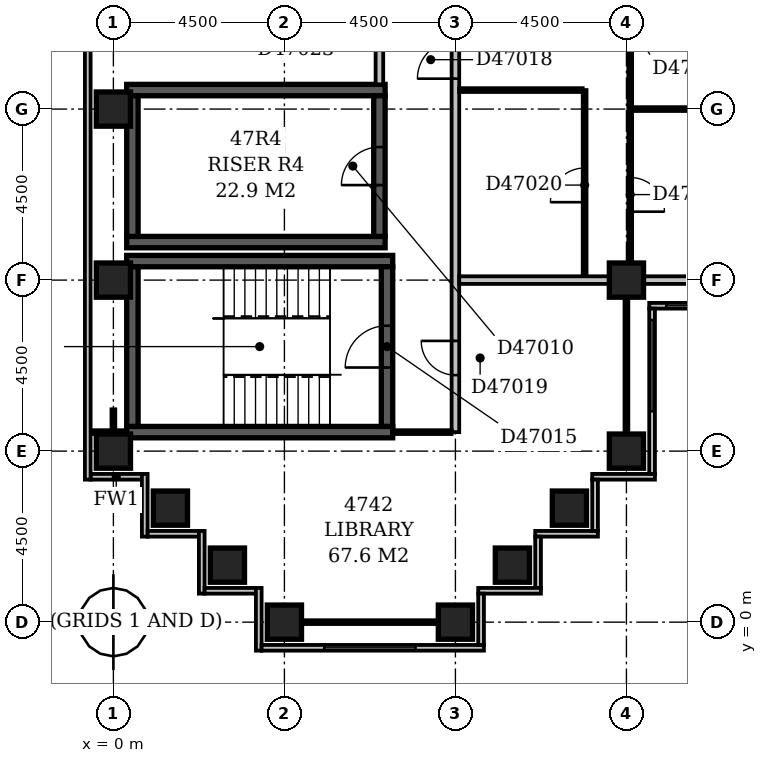
"""IFC4 building model, lengths in metres.
Left out: names, types, materials, properties, quantities, classifications, styles, units other than length and angle.
Written with IfcOpenShell. Run it as: python <this file> out.ifc"""

import sys

from ifc_helpers import new_model, si_unit, direction, frame, frame_2d, origin, origin_2d, place, context, subcontext, project, spatial, rectangle, extrude, element, fill, save


model = new_model("IFC4")
c1 = context("Model", 3, precision=1e-05, world=origin(), true_north=direction((0.0, 1.0)))
c2 = subcontext(c1, "Body", "Model", "MODEL_VIEW")
j1 = project(units=[si_unit("LENGTHUNIT", "METRE"), si_unit("PLANEANGLEUNIT", "RADIAN")], contexts=[c1])
p1 = place(None, origin())
s1 = spatial("IfcSite", under=j1, at=p1, CompositionType="ELEMENT")
p2 = place(p1, origin())
s2 = spatial("IfcBuilding", under=s1, at=p2, CompositionType="ELEMENT")
p3 = place(p2, frame((0.0, 0.0, 186.2)))
s3 = spatial("IfcBuildingStorey", under=s2, at=p3, CompositionType="ELEMENT", Elevation=186.2)
for number, where, z_axis, x_axis in (
    (1, (0.35, 5.0, -0.35), (0.0, 0.0, 1.0), (1.0, 0.0, 0.0)),
    (2, (0.35, 9.5, -0.35), (0.0, 0.0, 1.0), (1.0, 0.0, 0.0)),
):
    element("IfcWall", number, at=place(p3, frame(where, z_axis=z_axis, x_axis=x_axis)), inside=s3, PredefinedType="SHEAR", context=c2, shape_type="SweptSolid", body=[
        extrude(rectangle(XDim=7.0, YDim=0.3, at=frame_2d((3.5, 0.0))), origin(), (0.0, 0.0, 1.0), 3.65),
    ])
for number, where, z_axis, x_axis in (
    (3, (0.35, 10.0, -0.35), (0.0, 0.0, 1.0), (1.0, 0.0, 0.0)),
    (4, (0.35, 14.0, -0.35), (0.0, 0.0, 1.0), (1.0, 0.0, 0.0)),
):
    element("IfcWall", number, at=place(p3, frame(where, z_axis=z_axis, x_axis=x_axis)), inside=s3, PredefinedType="SHEAR", context=c2, shape_type="SweptSolid", body=[
        extrude(rectangle(XDim=6.8, YDim=0.3, at=frame_2d((3.4, 0.0))), origin(), (0.0, 0.0, 1.0), 3.65),
    ])
p4 = place(p3, frame((0.5, 5.15, -0.35), z_axis=(0.0, 0.0, 1.0), x_axis=(0.0, 1.0, 0.0)))
e5 = element("IfcWall", 5, at=p4, inside=s3, PredefinedType="SHEAR", context=c2, shape_type="SweptSolid", body=[
    extrude(rectangle(XDim=4.2, YDim=0.3, at=frame_2d((2.1, 0.0))), origin(), (0.0, 0.0, 1.0), 3.65),
])
p5 = place(p3, frame((0.5, 10.15, -0.35), z_axis=(0.0, 0.0, 1.0), x_axis=(0.0, 1.0, 0.0)))
e6 = element("IfcWall", 6, at=p5, inside=s3, PredefinedType="SHEAR", context=c2, shape_type="SweptSolid", body=[
    extrude(rectangle(XDim=3.7, YDim=0.3, at=frame_2d((1.85, 0.0))), origin(), (0.0, 0.0, 1.0), 3.65),
])
p6 = place(p3, frame((7.0, 10.15, -0.35), z_axis=(0.0, 0.0, 1.0), x_axis=(0.0, 1.0, 0.0)))
e7 = element("IfcWall", 7, at=p6, inside=s3, PredefinedType="SHEAR", context=c2, shape_type="SweptSolid", body=[
    extrude(rectangle(XDim=3.7, YDim=0.3, at=frame_2d((1.85, 0.0))), origin(), (0.0, 0.0, 1.0), 3.65),
])
p7 = place(p6, frame((1.35, 0.0, 0.35)))
e8 = element("IfcOpeningElement", 8, at=p7, cuts=e7, PredefinedType="OPENING", context=c2, shape_type="SweptSolid", body=[
    extrude(rectangle(XDim=1.0, YDim=2.1, at=frame_2d((0.5, 1.05))), frame((0.0, 0.162, 0.0), z_axis=(0.0, -1.0, 0.0), x_axis=(1.0, 0.0, 0.0)), (0.0, 0.0, 1.0), 0.324),
])
p8 = place(p3, frame((7.2, 5.15, -0.35), z_axis=(0.0, 0.0, 1.0), x_axis=(0.0, 1.0, 0.0)))
e9 = element("IfcWall", 9, at=p8, inside=s3, PredefinedType="SHEAR", context=c2, shape_type="SweptSolid", body=[
    extrude(rectangle(XDim=4.2, YDim=0.3, at=frame_2d((2.1, 0.0))), origin(), (0.0, 0.0, 1.0), 3.65),
])
p9 = place(p8, frame((1.55, 0.0, 0.35)))
e10 = element("IfcOpeningElement", 10, at=p9, cuts=e9, PredefinedType="OPENING", context=c2, shape_type="SweptSolid", body=[
    extrude(rectangle(XDim=1.1, YDim=2.1, at=frame_2d((0.55, 1.05))), frame((0.0, 0.162, 0.0), z_axis=(0.0, -1.0, 0.0), x_axis=(1.0, 0.0, 0.0)), (0.0, 0.0, 1.0), 0.324),
])
for number, where, z_axis, x_axis in (
    (11, (4.5, 0.0, -0.35), (0.0, 0.0, 1.0), (1.0, 0.0, 0.0)),
    (12, (9.0, 0.0, -0.35), (0.0, 0.0, 1.0), (1.0, 0.0, 0.0)),
    (13, (3.0, 1.5, -0.35), (0.0, 0.0, 1.0), (1.0, 0.0, 0.0)),
    (14, (10.5, 1.5, -0.35), (0.0, 0.0, 1.0), (1.0, 0.0, 0.0)),
    (15, (1.5, 3.0, -0.35), (0.0, 0.0, 1.0), (1.0, 0.0, 0.0)),
    (16, (12.0, 3.0, -0.35), (0.0, 0.0, 1.0), (1.0, 0.0, 0.0)),
    (17, (0.0, 4.5, -0.35), (0.0, 0.0, 1.0), (1.0, 0.0, 0.0)),
    (18, (13.5, 4.5, -0.35), (0.0, 0.0, 1.0), (1.0, 0.0, 0.0)),
    (19, (0.0, 9.0, -0.35), (0.0, 0.0, 1.0), (1.0, 0.0, 0.0)),
    (20, (13.5, 9.0, -0.35), (0.0, 0.0, 1.0), (1.0, 0.0, 0.0)),
    (21, (0.0, 13.5, -0.35), (0.0, 0.0, 1.0), (1.0, 0.0, 0.0)),
):
    element("IfcColumn", number, at=place(p3, frame(where, z_axis=z_axis, x_axis=x_axis)), inside=s3, PredefinedType="COLUMN", context=c2, shape_type="SweptSolid", body=[
        extrude(rectangle(XDim=0.9, YDim=0.9, at=origin_2d()), origin(), (0.0, 0.0, 1.0), 3.65),
    ])
p10 = place(p3, frame((-0.6, 3.825, 0.0), z_axis=(0.0, 0.0, 1.0), x_axis=(1.0, 0.0, 0.0)))
e22 = element("IfcWall", 22, at=p10, inside=s3, PredefinedType="STANDARD", context=c2, shape_type="SweptSolid", body=[
    extrude(rectangle(XDim=1.35, YDim=0.15, at=frame_2d((0.675, 0.0))), origin(), (0.0, 0.0, 1.0), 2.7),
])
p11 = place(p3, frame((0.825, 3.9, 0.0), z_axis=(0.0, 0.0, 1.0), x_axis=(0.0, -1.0, 0.0)))
e23 = element("IfcWall", 23, at=p11, inside=s3, PredefinedType="STANDARD", context=c2, shape_type="SweptSolid", body=[
    extrude(rectangle(XDim=1.65, YDim=0.15, at=frame_2d((0.825, 0.0))), origin(), (0.0, 0.0, 1.0), 2.7),
])
p12 = place(p3, frame((0.9, 2.325, 0.0), z_axis=(0.0, 0.0, 1.0), x_axis=(1.0, 0.0, 0.0)))
e24 = element("IfcWall", 24, at=p12, inside=s3, PredefinedType="STANDARD", context=c2, shape_type="SweptSolid", body=[
    extrude(rectangle(XDim=1.35, YDim=0.15, at=frame_2d((0.675, 0.0))), origin(), (0.0, 0.0, 1.0), 2.7),
])
p13 = place(p3, frame((2.325, 2.4, 0.0), z_axis=(0.0, 0.0, 1.0), x_axis=(0.0, -1.0, 0.0)))
e25 = element("IfcWall", 25, at=p13, inside=s3, PredefinedType="STANDARD", context=c2, shape_type="SweptSolid", body=[
    extrude(rectangle(XDim=1.65, YDim=0.15, at=frame_2d((0.825, 0.0))), origin(), (0.0, 0.0, 1.0), 2.7),
])
p14 = place(p3, frame((2.4, 0.825, 0.0), z_axis=(0.0, 0.0, 1.0), x_axis=(1.0, 0.0, 0.0)))
e26 = element("IfcWall", 26, at=p14, inside=s3, PredefinedType="STANDARD", context=c2, shape_type="SweptSolid", body=[
    extrude(rectangle(XDim=1.35, YDim=0.15, at=frame_2d((0.675, 0.0))), origin(), (0.0, 0.0, 1.0), 2.7),
])
p15 = place(p3, frame((3.825, 0.9, 0.0), z_axis=(0.0, 0.0, 1.0), x_axis=(0.0, -1.0, 0.0)))
e27 = element("IfcWall", 27, at=p15, inside=s3, PredefinedType="STANDARD", context=c2, shape_type="SweptSolid", body=[
    extrude(rectangle(XDim=1.65, YDim=0.15, at=frame_2d((0.825, 0.0))), origin(), (0.0, 0.0, 1.0), 2.7),
])
p16 = place(p3, frame((3.9, -0.675, 0.0), z_axis=(0.0, 0.0, 1.0), x_axis=(1.0, 0.0, 0.0)))
e28 = element("IfcWall", 28, at=p16, inside=s3, PredefinedType="STANDARD", context=c2, shape_type="SweptSolid", body=[
    extrude(rectangle(XDim=5.85, YDim=0.15, at=frame_2d((2.925, 0.0))), origin(), (0.0, 0.0, 1.0), 2.7),
])
p17 = place(p16, frame((1.65, 0.0, 0.6)))
e29 = element("IfcOpeningElement", 29, at=p17, cuts=e28, PredefinedType="OPENING", context=c2, shape_type="SweptSolid", body=[
    extrude(rectangle(XDim=2.4, YDim=1.8, at=frame_2d((1.2, 0.9))), frame((0.0, 0.087, 0.0), z_axis=(0.0, -1.0, 0.0), x_axis=(1.0, 0.0, 0.0)), (0.0, 0.0, 1.0), 0.174),
])
p18 = place(p3, frame((9.675, -0.6, 0.0), z_axis=(0.0, 0.0, 1.0), x_axis=(0.0, 1.0, 0.0)))
e30 = element("IfcWall", 30, at=p18, inside=s3, PredefinedType="STANDARD", context=c2, shape_type="SweptSolid", body=[
    extrude(rectangle(XDim=1.35, YDim=0.15, at=frame_2d((0.675, 0.0))), origin(), (0.0, 0.0, 1.0), 2.7),
])
p19 = place(p3, frame((9.6, 0.825, 0.0), z_axis=(0.0, 0.0, 1.0), x_axis=(1.0, 0.0, 0.0)))
e31 = element("IfcWall", 31, at=p19, inside=s3, PredefinedType="STANDARD", context=c2, shape_type="SweptSolid", body=[
    extrude(rectangle(XDim=1.65, YDim=0.15, at=frame_2d((0.825, 0.0))), origin(), (0.0, 0.0, 1.0), 2.7),
])
p20 = place(p3, frame((11.175, 0.9, 0.0), z_axis=(0.0, 0.0, 1.0), x_axis=(0.0, 1.0, 0.0)))
e32 = element("IfcWall", 32, at=p20, inside=s3, PredefinedType="STANDARD", context=c2, shape_type="SweptSolid", body=[
    extrude(rectangle(XDim=1.35, YDim=0.15, at=frame_2d((0.675, 0.0))), origin(), (0.0, 0.0, 1.0), 2.7),
])
p21 = place(p3, frame((11.1, 2.325, 0.0), z_axis=(0.0, 0.0, 1.0), x_axis=(1.0, 0.0, 0.0)))
e33 = element("IfcWall", 33, at=p21, inside=s3, PredefinedType="STANDARD", context=c2, shape_type="SweptSolid", body=[
    extrude(rectangle(XDim=1.65, YDim=0.15, at=frame_2d((0.825, 0.0))), origin(), (0.0, 0.0, 1.0), 2.7),
])
p22 = place(p3, frame((12.675, 2.4, 0.0), z_axis=(0.0, 0.0, 1.0), x_axis=(0.0, 1.0, 0.0)))
e34 = element("IfcWall", 34, at=p22, inside=s3, PredefinedType="STANDARD", context=c2, shape_type="SweptSolid", body=[
    extrude(rectangle(XDim=1.35, YDim=0.15, at=frame_2d((0.675, 0.0))), origin(), (0.0, 0.0, 1.0), 2.7),
])
p23 = place(p3, frame((12.6, 3.825, 0.0), z_axis=(0.0, 0.0, 1.0), x_axis=(1.0, 0.0, 0.0)))
e35 = element("IfcWall", 35, at=p23, inside=s3, PredefinedType="STANDARD", context=c2, shape_type="SweptSolid", body=[
    extrude(rectangle(XDim=1.65, YDim=0.15, at=frame_2d((0.825, 0.0))), origin(), (0.0, 0.0, 1.0), 2.7),
])
p24 = place(p3, frame((14.175, 3.9, 0.0), z_axis=(0.0, 0.0, 1.0), x_axis=(0.0, 1.0, 0.0)))
e36 = element("IfcWall", 36, at=p24, inside=s3, PredefinedType="STANDARD", context=c2, shape_type="SweptSolid", body=[
    extrude(rectangle(XDim=4.35, YDim=0.15, at=frame_2d((2.175, 0.0))), origin(), (0.0, 0.0, 1.0), 2.7),
])
p25 = place(p24, frame((1.65, 0.0, 0.6)))
e37 = element("IfcOpeningElement", 37, at=p25, cuts=e36, PredefinedType="OPENING", context=c2, shape_type="SweptSolid", body=[
    extrude(rectangle(XDim=2.4, YDim=1.8, at=frame_2d((1.2, 0.9))), frame((0.0, 0.087, 0.0), z_axis=(0.0, -1.0, 0.0), x_axis=(1.0, 0.0, 0.0)), (0.0, 0.0, 1.0), 0.174),
])
p26 = place(p3, frame((14.1, 8.325, 0.0), z_axis=(0.0, 0.0, 1.0), x_axis=(1.0, 0.0, 0.0)))
e38 = element("IfcWall", 38, at=p26, inside=s3, PredefinedType="STANDARD", context=c2, shape_type="SweptSolid", body=[
    extrude(rectangle(XDim=4.65, YDim=0.15, at=frame_2d((2.325, 0.0))), origin(), (0.0, 0.0, 1.0), 2.7),
])
p27 = place(p26, frame((0.45, 0.0, 0.6)))
e39 = element("IfcOpeningElement", 39, at=p27, cuts=e38, PredefinedType="OPENING", context=c2, shape_type="SweptSolid", body=[
    extrude(rectangle(XDim=2.4, YDim=1.8, at=frame_2d((1.2, 0.9))), frame((0.0, 0.087, 0.0), z_axis=(0.0, -1.0, 0.0), x_axis=(1.0, 0.0, 0.0)), (0.0, 0.0, 1.0), 0.174),
])
p28 = place(p3, frame((-0.675, 59.1, 0.0), z_axis=(0.0, 0.0, 1.0), x_axis=(0.0, -1.0, 0.0)))
e40 = element("IfcWall", 40, at=p28, inside=s3, PredefinedType="STANDARD", context=c2, shape_type="SweptSolid", body=[
    extrude(rectangle(XDim=55.35, YDim=0.15, at=frame_2d((27.675, 0.0))), origin(), (0.0, 0.0, 1.0), 2.7),
])
p29 = place(p3, frame((4.95, 0.0, 0.0), z_axis=(0.0, 0.0, 1.0), x_axis=(1.0, 0.0, 0.0)))
e41 = element("IfcWall", 41, at=p29, inside=s3, PredefinedType="PARTITIONING", context=c2, shape_type="SweptSolid", body=[
    extrude(rectangle(XDim=3.6, YDim=0.1, at=frame_2d((1.8, 0.0))), origin(), (0.0, 0.0, 1.0), 2.7),
])
p30 = place(p3, frame((0.0, 4.95, 0.0), z_axis=(0.0, 0.0, 1.0), x_axis=(0.0, 1.0, 0.0)))
e42 = element("IfcWall", 42, at=p30, inside=s3, PredefinedType="PARTITIONING", context=c2, shape_type="SweptSolid", body=[
    extrude(rectangle(XDim=0.65, YDim=0.1, at=frame_2d((0.325, 0.0))), origin(), (0.0, 0.0, 1.0), 2.7),
])
p31 = place(p3, frame((13.5, 4.95, 0.0), z_axis=(0.0, 0.0, 1.0), x_axis=(0.0, 1.0, 0.0)))
e43 = element("IfcWall", 43, at=p31, inside=s3, PredefinedType="PARTITIONING", context=c2, shape_type="SweptSolid", body=[
    extrude(rectangle(XDim=3.6, YDim=0.1, at=frame_2d((1.8, 0.0))), origin(), (0.0, 0.0, 1.0), 2.7),
])
p32 = place(p3, frame((-0.6, 5.0, 0.0), z_axis=(0.0, 0.0, 1.0), x_axis=(1.0, 0.0, 0.0)))
e44 = element("IfcWall", 44, at=p32, inside=s3, PredefinedType="PARTITIONING", context=c2, shape_type="SweptSolid", body=[
    extrude(rectangle(XDim=0.951, YDim=0.1, at=frame_2d((0.476, 0.0))), origin(), (0.0, 0.0, 1.0), 3.3),
])
p33 = place(p3, frame((7.349, 5.0, 0.0), z_axis=(0.0, 0.0, 1.0), x_axis=(1.0, 0.0, 0.0)))
e45 = element("IfcWall", 45, at=p33, inside=s3, PredefinedType="PARTITIONING", context=c2, shape_type="SweptSolid", body=[
    extrude(rectangle(XDim=1.551, YDim=0.1, at=frame_2d((0.775, 0.0))), origin(), (0.0, 0.0, 1.0), 3.3),
])
p34 = place(p3, frame((9.0, 5.0, 0.0), z_axis=(0.0, 0.0, 1.0), x_axis=(0.0, 1.0, 0.0)))
e46 = element("IfcWall", 46, at=p34, inside=s3, PredefinedType="PARTITIONING", context=c2, shape_type="SweptSolid", body=[
    extrude(rectangle(XDim=31.0, YDim=0.2, at=frame_2d((15.5, 0.0))), origin(), (0.0, 0.0, 1.0), 3.3),
])
p35 = place(p34, frame((17.8, 0.0, 0.0)))
e47 = element("IfcOpeningElement", 47, at=p35, cuts=e46, PredefinedType="OPENING", context=c2, shape_type="SweptSolid", body=[
    extrude(rectangle(XDim=1.0, YDim=2.1, at=frame_2d((0.5, 1.05))), frame((0.0, 0.112, 0.0), z_axis=(0.0, -1.0, 0.0), x_axis=(1.0, 0.0, 0.0)), (0.0, 0.0, 1.0), 0.224),
])
p36 = place(p34, frame((14.95, 0.0, 0.0)))
e48 = element("IfcOpeningElement", 48, at=p36, cuts=e46, PredefinedType="OPENING", context=c2, shape_type="SweptSolid", body=[
    extrude(rectangle(XDim=1.0, YDim=2.1, at=frame_2d((0.5, 1.05))), frame((0.0, 0.112, 0.0), z_axis=(0.0, -1.0, 0.0), x_axis=(1.0, 0.0, 0.0)), (0.0, 0.0, 1.0), 0.224),
])
p37 = place(p34, frame((9.3, 0.0, 0.0)))
e49 = element("IfcOpeningElement", 49, at=p37, cuts=e46, PredefinedType="OPENING", context=c2, shape_type="SweptSolid", body=[
    extrude(rectangle(XDim=1.0, YDim=2.1, at=frame_2d((0.5, 1.05))), frame((0.0, 0.112, 0.0), z_axis=(0.0, -1.0, 0.0), x_axis=(1.0, 0.0, 0.0)), (0.0, 0.0, 1.0), 0.224),
])
p38 = place(p34, frame((1.5, 0.0, 0.0)))
e50 = element("IfcOpeningElement", 50, at=p38, cuts=e46, PredefinedType="OPENING", context=c2, shape_type="SweptSolid", body=[
    extrude(rectangle(XDim=0.9, YDim=2.1, at=frame_2d((0.45, 1.05))), frame((0.0, 0.112, 0.0), z_axis=(0.0, -1.0, 0.0), x_axis=(1.0, 0.0, 0.0)), (0.0, 0.0, 1.0), 0.224),
])
p39 = place(p3, frame((9.1, 9.0, 0.0), z_axis=(0.0, 0.0, 1.0), x_axis=(1.0, 0.0, 0.0)))
e51 = element("IfcWall", 51, at=p39, inside=s3, PredefinedType="PARTITIONING", context=c2, shape_type="SweptSolid", body=[
    extrude(rectangle(XDim=3.95, YDim=0.2, at=frame_2d((1.975, 0.0))), origin(), (0.0, 0.0, 1.0), 3.3),
])
p40 = place(p3, frame((13.95, 9.0, 0.0), z_axis=(0.0, 0.0, 1.0), x_axis=(1.0, 0.0, 0.0)))
e52 = element("IfcWall", 52, at=p40, inside=s3, PredefinedType="PARTITIONING", context=c2, shape_type="SweptSolid", body=[
    extrude(rectangle(XDim=3.6, YDim=0.2, at=frame_2d((1.8, 0.0))), origin(), (0.0, 0.0, 1.0), 2.7),
])
p41 = place(p3, frame((12.4, 9.1, 0.0), z_axis=(0.0, 0.0, 1.0), x_axis=(0.0, 1.0, 0.0)))
e53 = element("IfcWall", 53, at=p41, inside=s3, PredefinedType="PARTITIONING", context=c2, shape_type="SweptSolid", body=[
    extrude(rectangle(XDim=4.9, YDim=0.1, at=frame_2d((2.45, 0.0))), origin(), (0.0, 0.0, 1.0), 3.3),
])
p42 = place(p41, frame((1.95, 0.0, 0.0)))
e54 = element("IfcOpeningElement", 54, at=p42, cuts=e53, PredefinedType="OPENING", context=c2, shape_type="SweptSolid", body=[
    extrude(rectangle(XDim=0.9, YDim=2.1, at=frame_2d((0.45, 1.05))), frame((0.0, 0.062, 0.0), z_axis=(0.0, -1.0, 0.0), x_axis=(1.0, 0.0, 0.0)), (0.0, 0.0, 1.0), 0.124),
])
p43 = place(p3, frame((13.6, 9.45, 0.0), z_axis=(0.0, 0.0, 1.0), x_axis=(0.0, 1.0, 0.0)))
e55 = element("IfcWall", 55, at=p43, inside=s3, PredefinedType="PARTITIONING", context=c2, shape_type="SweptSolid", body=[
    extrude(rectangle(XDim=8.45, YDim=0.1, at=frame_2d((4.225, 0.0))), origin(), (0.0, 0.0, 1.0), 3.3),
])
p44 = place(p43, frame((1.35, 0.0, 0.0)))
e56 = element("IfcOpeningElement", 56, at=p44, cuts=e55, PredefinedType="OPENING", context=c2, shape_type="SweptSolid", body=[
    extrude(rectangle(XDim=0.9, YDim=2.1, at=frame_2d((0.45, 1.05))), frame((0.0, 0.062, 0.0), z_axis=(0.0, -1.0, 0.0), x_axis=(1.0, 0.0, 0.0)), (0.0, 0.0, 1.0), 0.124),
])
p45 = place(p43, frame((5.85, 0.0, 0.0)))
e57 = element("IfcOpeningElement", 57, at=p45, cuts=e55, PredefinedType="OPENING", context=c2, shape_type="SweptSolid", body=[
    extrude(rectangle(XDim=0.9, YDim=2.1, at=frame_2d((0.45, 1.05))), frame((0.0, 0.062, 0.0), z_axis=(0.0, -1.0, 0.0), x_axis=(1.0, 0.0, 0.0)), (0.0, 0.0, 1.0), 0.124),
])
p46 = place(p3, frame((13.65, 13.5, 0.0), z_axis=(0.0, 0.0, 1.0), x_axis=(1.0, 0.0, 0.0)))
e58 = element("IfcWall", 58, at=p46, inside=s3, PredefinedType="PARTITIONING", context=c2, shape_type="SweptSolid", body=[
    extrude(rectangle(XDim=3.9, YDim=0.1, at=frame_2d((1.95, 0.0))), origin(), (0.0, 0.0, 1.0), 3.3),
])
p47 = place(p3, frame((9.1, 14.0, 0.0), z_axis=(0.0, 0.0, 1.0), x_axis=(1.0, 0.0, 0.0)))
e59 = element("IfcWall", 59, at=p47, inside=s3, PredefinedType="PARTITIONING", context=c2, shape_type="SweptSolid", body=[
    extrude(rectangle(XDim=3.25, YDim=0.1, at=frame_2d((1.625, 0.0))), origin(), (0.0, 0.0, 1.0), 3.3),
])
p48 = place(p3, frame((7.0, 14.15, 0.0), z_axis=(0.0, 0.0, 1.0), x_axis=(0.0, 1.0, 0.0)))
e60 = element("IfcWall", 60, at=p48, inside=s3, PredefinedType="PARTITIONING", context=c2, shape_type="SweptSolid", body=[
    extrude(rectangle(XDim=4.2, YDim=0.2, at=frame_2d((2.1, 0.0))), origin(), (0.0, 0.0, 1.0), 3.3),
])
p49 = place(p48, frame((1.6, 0.0, 0.0)))
e61 = element("IfcOpeningElement", 61, at=p49, cuts=e60, PredefinedType="OPENING", context=c2, shape_type="SweptSolid", body=[
    extrude(rectangle(XDim=1.0, YDim=2.1, at=frame_2d((0.5, 1.05))), frame((0.0, 0.112, 0.0), z_axis=(0.0, -1.0, 0.0), x_axis=(1.0, 0.0, 0.0)), (0.0, 0.0, 1.0), 0.224),
])
p50 = place(p17, origin())
e62 = element("IfcWindow", 62, at=p50, inside=s3, PartitioningType="SINGLE_PANEL", PredefinedType="WINDOW", context=c2, shape_type="SweptSolid", body=[
    extrude(rectangle(XDim=2.4, YDim=1.8, at=frame_2d((1.2, 0.9))), frame((0.0, 0.03, 0.0), z_axis=(0.0, -1.0, 0.0), x_axis=(1.0, 0.0, 0.0)), (0.0, 0.0, 1.0), 0.06),
])
fill(e29, e62)
p51 = place(p25, origin())
e63 = element("IfcWindow", 63, at=p51, inside=s3, PartitioningType="SINGLE_PANEL", PredefinedType="WINDOW", context=c2, shape_type="SweptSolid", body=[
    extrude(rectangle(XDim=2.4, YDim=1.8, at=frame_2d((1.2, 0.9))), frame((0.0, 0.03, 0.0), z_axis=(0.0, -1.0, 0.0), x_axis=(1.0, 0.0, 0.0)), (0.0, 0.0, 1.0), 0.06),
])
fill(e37, e63)
p52 = place(p27, origin())
e64 = element("IfcWindow", 64, at=p52, inside=s3, PartitioningType="SINGLE_PANEL", PredefinedType="WINDOW", context=c2, shape_type="SweptSolid", body=[
    extrude(rectangle(XDim=2.4, YDim=1.8, at=frame_2d((1.2, 0.9))), frame((0.0, 0.03, 0.0), z_axis=(0.0, -1.0, 0.0), x_axis=(1.0, 0.0, 0.0)), (0.0, 0.0, 1.0), 0.06),
])
fill(e39, e64)
p53 = place(p7, origin())
e65 = element("IfcDoor", 65, at=p53, inside=s3, OperationType="SINGLE_SWING_LEFT", PredefinedType="DOOR", context=c2, shape_type="SweptSolid", body=[
    extrude(rectangle(XDim=1.0, YDim=2.1, at=frame_2d((0.5, 1.05))), frame((0.0, 0.025, 0.0), z_axis=(0.0, -1.0, 0.0), x_axis=(1.0, 0.0, 0.0)), (0.0, 0.0, 1.0), 0.05),
])
fill(e8, e65)
p54 = place(p9, origin())
e66 = element("IfcDoor", 66, at=p54, inside=s3, OperationType="SINGLE_SWING_LEFT", PredefinedType="DOOR", context=c2, shape_type="SweptSolid", body=[
    extrude(rectangle(XDim=1.1, YDim=2.1, at=frame_2d((0.55, 1.05))), frame((0.0, 0.025, 0.0), z_axis=(0.0, -1.0, 0.0), x_axis=(1.0, 0.0, 0.0)), (0.0, 0.0, 1.0), 0.05),
])
fill(e10, e66)
p55 = place(p37, origin())
e67 = element("IfcDoor", 67, at=p55, inside=s3, OperationType="SINGLE_SWING_LEFT", PredefinedType="DOOR", context=c2, shape_type="SweptSolid", body=[
    extrude(rectangle(XDim=1.0, YDim=2.1, at=frame_2d((0.5, 1.05))), frame((0.0, 0.025, 0.0), z_axis=(0.0, -1.0, 0.0), x_axis=(1.0, 0.0, 0.0)), (0.0, 0.0, 1.0), 0.05),
])
fill(e49, e67)
p56 = place(p38, frame((0.9, 0.0, 0.0), z_axis=(0.0, 0.0, 1.0), x_axis=(-1.0, 0.0, 0.0)))
e68 = element("IfcDoor", 68, at=p56, inside=s3, OperationType="SINGLE_SWING_LEFT", PredefinedType="DOOR", context=c2, shape_type="SweptSolid", body=[
    extrude(rectangle(XDim=0.9, YDim=2.1, at=frame_2d((0.45, 1.05))), frame((0.0, 0.025, 0.0), z_axis=(0.0, -1.0, 0.0), x_axis=(1.0, 0.0, 0.0)), (0.0, 0.0, 1.0), 0.05),
])
fill(e50, e68)
p57 = place(p42, origin())
e69 = element("IfcDoor", 69, at=p57, inside=s3, OperationType="SINGLE_SWING_LEFT", PredefinedType="DOOR", context=c2, shape_type="SweptSolid", body=[
    extrude(rectangle(XDim=0.9, YDim=2.1, at=frame_2d((0.45, 1.05))), frame((0.0, 0.025, 0.0), z_axis=(0.0, -1.0, 0.0), x_axis=(1.0, 0.0, 0.0)), (0.0, 0.0, 1.0), 0.05),
])
fill(e54, e69)
p58 = place(p44, frame((0.9, 0.0, 0.0), z_axis=(0.0, 0.0, 1.0), x_axis=(-1.0, 0.0, 0.0)))
e70 = element("IfcDoor", 70, at=p58, inside=s3, OperationType="SINGLE_SWING_RIGHT", PredefinedType="DOOR", context=c2, shape_type="SweptSolid", body=[
    extrude(rectangle(XDim=0.9, YDim=2.1, at=frame_2d((0.45, 1.05))), frame((0.0, 0.025, 0.0), z_axis=(0.0, -1.0, 0.0), x_axis=(1.0, 0.0, 0.0)), (0.0, 0.0, 1.0), 0.05),
])
fill(e56, e70)
save(model, sys.argv[1])
